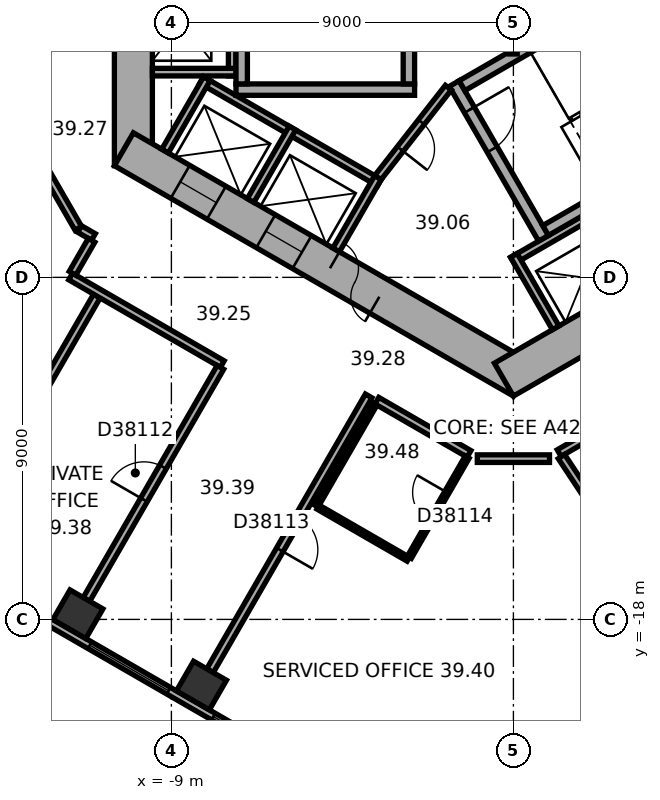
"""IFC4 building model, lengths in metres.
Left out: names, types, materials, properties, quantities, classifications, styles, units other than length and angle.
Written with IfcOpenShell. Run it as: python <this file> out.ifc"""

import sys

from ifc_helpers import new_model, si_unit, direction, frame, frame_2d, origin, origin_2d, place, context, subcontext, project, spatial, rectangle, extrude, element, fill, save


model = new_model("IFC4")
c1 = context("Model", 3, precision=1e-05, world=origin(), true_north=direction((0.0, 1.0)))
c2 = subcontext(c1, "Body", "Model", "MODEL_VIEW")
j1 = project(units=[si_unit("LENGTHUNIT", "METRE"), si_unit("PLANEANGLEUNIT", "RADIAN")], contexts=[c1])
p1 = place(None, origin())
s1 = spatial("IfcSite", under=j1, at=p1, CompositionType="ELEMENT")
p2 = place(p1, origin())
s2 = spatial("IfcBuilding", under=s1, at=p2, CompositionType="ELEMENT")
p3 = place(p2, frame((0.0, 0.0, 161.4)))
s3 = spatial("IfcBuildingStorey", under=s2, at=p3, CompositionType="ELEMENT", Elevation=161.4)
for number, where, z_axis, x_axis in (
    (1, (-11.46, -17.863, 0.0), (0.0, 0.0, 1.0), (0.866, -0.5, 0.0)),
    (2, (-8.208, -19.74, 0.0), (0.0, 0.0, 1.0), (0.866, -0.5, 0.0)),
):
    element("IfcColumn", number, at=place(p3, frame(where, z_axis=z_axis, x_axis=x_axis)), inside=s3, PredefinedType="COLUMN", context=c2, shape_type="SweptSolid", body=[
        extrude(rectangle(XDim=1.0, YDim=0.9, at=origin_2d()), origin(), (0.0, 0.0, 1.0), 3.7),
    ])
p4 = place(p3, frame((-10.0, 6.062, 0.0), z_axis=(0.0, 0.0, 1.0), x_axis=(0.0, -1.0, 0.0)))
e3 = element("IfcWall", 3, at=p4, inside=s3, PredefinedType="SHEAR", context=c2, shape_type="SweptSolid", body=[
    extrude(rectangle(XDim=12.125, YDim=1.0, at=frame_2d((6.062, 0.0))), origin(), (0.0, 0.0, 1.0), 3.7),
])
p5 = place(p4, frame((5.212, 0.0, 0.0)))
e4 = element("IfcOpeningElement", 4, at=p5, cuts=e3, PredefinedType="OPENING", context=c2, shape_type="SweptSolid", body=[
    extrude(rectangle(XDim=1.1, YDim=2.1, at=frame_2d((0.55, 1.05))), frame((0.0, 0.51, 0.0), z_axis=(0.0, -1.0, 0.0), x_axis=(1.0, 0.0, 0.0)), (0.0, 0.0, 1.0), 1.02),
])
p6 = place(p4, frame((7.812, 0.0, 0.0)))
e5 = element("IfcOpeningElement", 5, at=p6, cuts=e3, PredefinedType="OPENING", context=c2, shape_type="SweptSolid", body=[
    extrude(rectangle(XDim=1.1, YDim=2.1, at=frame_2d((0.55, 1.05))), frame((0.0, 0.51, 0.0), z_axis=(0.0, -1.0, 0.0), x_axis=(1.0, 0.0, 0.0)), (0.0, 0.0, 1.0), 1.02),
])
p7 = place(p3, frame((-10.25, -5.629, 0.0), z_axis=(0.0, 0.0, 1.0), x_axis=(0.866022616891, -0.50000482701, 0.0)))
e6 = element("IfcWall", 6, at=p7, inside=s3, PredefinedType="SHEAR", context=c2, shape_type="SweptSolid", body=[
    extrude(rectangle(XDim=12.125, YDim=1.0, at=frame_2d((6.062, 0.0))), origin(), (0.0, 0.0, 1.0), 3.7),
])
p8 = place(p7, frame((6.262, 0.0, 0.0)))
e7 = element("IfcOpeningElement", 7, at=p8, cuts=e6, PredefinedType="OPENING", context=c2, shape_type="SweptSolid", body=[
    extrude(rectangle(XDim=1.5, YDim=2.1, at=frame_2d((0.75, 1.05))), frame((0.0, 0.51, 0.0), z_axis=(0.0, -1.0, 0.0), x_axis=(1.0, 0.0, 0.0)), (0.0, 0.0, 1.0), 1.02),
])
p9 = place(p7, frame((1.712, 0.0, 0.0)))
e8 = element("IfcOpeningElement", 8, at=p9, cuts=e6, PredefinedType="OPENING", context=c2, shape_type="SweptSolid", body=[
    extrude(rectangle(XDim=1.1, YDim=2.1, at=frame_2d((0.55, 1.05))), frame((0.0, 0.51, 0.0), z_axis=(0.0, -1.0, 0.0), x_axis=(1.0, 0.0, 0.0)), (0.0, 0.0, 1.0), 1.02),
])
p10 = place(p7, frame((4.312, 0.0, 0.0)))
e9 = element("IfcOpeningElement", 9, at=p10, cuts=e6, PredefinedType="OPENING", context=c2, shape_type="SweptSolid", body=[
    extrude(rectangle(XDim=1.1, YDim=2.1, at=frame_2d((0.55, 1.05))), frame((0.0, 0.51, 0.0), z_axis=(0.0, -1.0, 0.0), x_axis=(1.0, 0.0, 0.0)), (0.0, 0.0, 1.0), 1.02),
])
p11 = place(p3, frame((-0.25, -11.691, 0.0), z_axis=(0.0, 0.0, 1.0), x_axis=(0.866022616891, 0.50000482701, 0.0)))
e10 = element("IfcWall", 10, at=p11, inside=s3, PredefinedType="SHEAR", context=c2, shape_type="SweptSolid", body=[
    extrude(rectangle(XDim=12.125, YDim=1.0, at=frame_2d((6.062, 0.0))), origin(), (0.0, 0.0, 1.0), 3.7),
])
p12 = place(p11, frame((2.612, 0.0, 0.0)))
e11 = element("IfcOpeningElement", 11, at=p12, cuts=e10, PredefinedType="OPENING", context=c2, shape_type="SweptSolid", body=[
    extrude(rectangle(XDim=1.1, YDim=2.1, at=frame_2d((0.55, 1.05))), frame((0.0, 0.51, 0.0), z_axis=(0.0, -1.0, 0.0), x_axis=(1.0, 0.0, 0.0)), (0.0, 0.0, 1.0), 1.02),
])
p13 = place(p11, frame((5.212, 0.0, 0.0)))
e12 = element("IfcOpeningElement", 12, at=p13, cuts=e10, PredefinedType="OPENING", context=c2, shape_type="SweptSolid", body=[
    extrude(rectangle(XDim=1.1, YDim=2.1, at=frame_2d((0.55, 1.05))), frame((0.0, 0.51, 0.0), z_axis=(0.0, -1.0, 0.0), x_axis=(1.0, 0.0, 0.0)), (0.0, 0.0, 1.0), 1.02),
])
p14 = place(p11, frame((7.812, 0.0, 0.0)))
e13 = element("IfcOpeningElement", 13, at=p14, cuts=e10, PredefinedType="OPENING", context=c2, shape_type="SweptSolid", body=[
    extrude(rectangle(XDim=1.1, YDim=2.1, at=frame_2d((0.55, 1.05))), frame((0.0, 0.51, 0.0), z_axis=(0.0, -1.0, 0.0), x_axis=(1.0, 0.0, 0.0)), (0.0, 0.0, 1.0), 1.02),
])
p15 = place(p3, frame((-18.789, -14.267, 0.0), z_axis=(0.0, 0.0, 1.0), x_axis=(0.866023315909, -0.500003616288, 0.0)))
e14 = element("IfcWall", 14, at=p15, inside=s3, PredefinedType="STANDARD", context=c2, shape_type="SweptSolid", body=[
    extrude(rectangle(XDim=20.044, YDim=0.2, at=frame_2d((10.022, 0.0))), origin(), (0.0, 0.0, 1.0), 3.7),
])
p16 = place(p15, frame((1.314, 0.0, 0.9)))
e15 = element("IfcOpeningElement", 15, at=p16, cuts=e14, PredefinedType="OPENING", context=c2, shape_type="SweptSolid", body=[
    extrude(rectangle(XDim=2.4, YDim=2.0, at=frame_2d((1.2, 1.0))), frame((0.0, 0.11, 0.0), z_axis=(0.0, -1.0, 0.0), x_axis=(1.0, 0.0, 0.0)), (0.0, 0.0, 1.0), 0.22),
])
p17 = place(p15, frame((5.069, 0.0, 0.9)))
e16 = element("IfcOpeningElement", 16, at=p17, cuts=e14, PredefinedType="OPENING", context=c2, shape_type="SweptSolid", body=[
    extrude(rectangle(XDim=2.4, YDim=2.0, at=frame_2d((1.2, 1.0))), frame((0.0, 0.11, 0.0), z_axis=(0.0, -1.0, 0.0), x_axis=(1.0, 0.0, 0.0)), (0.0, 0.0, 1.0), 0.22),
])
p18 = place(p15, frame((8.823, 0.0, 0.9)))
e17 = element("IfcOpeningElement", 17, at=p18, cuts=e14, PredefinedType="OPENING", context=c2, shape_type="SweptSolid", body=[
    extrude(rectangle(XDim=2.4, YDim=2.0, at=frame_2d((1.2, 1.0))), frame((0.0, 0.11, 0.0), z_axis=(0.0, -1.0, 0.0), x_axis=(1.0, 0.0, 0.0)), (0.0, 0.0, 1.0), 0.22),
])
p19 = place(p15, frame((12.577, 0.0, 0.9)))
e18 = element("IfcOpeningElement", 18, at=p19, cuts=e14, PredefinedType="OPENING", context=c2, shape_type="SweptSolid", body=[
    extrude(rectangle(XDim=2.4, YDim=2.0, at=frame_2d((1.2, 1.0))), frame((0.0, 0.11, 0.0), z_axis=(0.0, -1.0, 0.0), x_axis=(1.0, 0.0, 0.0)), (0.0, 0.0, 1.0), 0.22),
])
p20 = place(p15, frame((16.331, 0.0, 0.9)))
e19 = element("IfcOpeningElement", 19, at=p20, cuts=e14, PredefinedType="OPENING", context=c2, shape_type="SweptSolid", body=[
    extrude(rectangle(XDim=2.4, YDim=2.0, at=frame_2d((1.2, 1.0))), frame((0.0, 0.11, 0.0), z_axis=(0.0, -1.0, 0.0), x_axis=(1.0, 0.0, 0.0)), (0.0, 0.0, 1.0), 0.22),
])
p21 = place(p3, frame((-7.4, 4.3, 0.0), z_axis=(0.0, 0.0, 1.0), x_axis=(0.0, -1.0, 0.0)))
e20 = element("IfcWall", 20, at=p21, inside=s3, PredefinedType="PARTITIONING", context=c2, shape_type="SweptSolid", body=[
    extrude(rectangle(XDim=8.0, YDim=0.2, at=frame_2d((4.0, 0.0))), origin(), (0.0, 0.0, 1.0), 3.42),
])
p22 = place(p3, frame((-7.3, -3.6, 0.0), z_axis=(0.0, 0.0, 1.0), x_axis=(-1.0, 0.0, 0.0)))
e21 = element("IfcWall", 21, at=p22, inside=s3, PredefinedType="PARTITIONING", context=c2, shape_type="SweptSolid", body=[
    extrude(rectangle(XDim=2.2, YDim=0.2, at=frame_2d((1.1, 0.0))), origin(), (0.0, 0.0, 1.0), 3.42),
])
p23 = place(p3, frame((-8.203, -3.809, 0.0), z_axis=(0.0, 0.0, 1.0), x_axis=(0.866028230842, -0.499995103361, 0.0)))
e22 = element("IfcWall", 22, at=p23, inside=s3, PredefinedType="PARTITIONING", context=c2, shape_type="SweptSolid", body=[
    extrude(rectangle(XDim=5.4, YDim=0.2, at=frame_2d((2.7, 0.0))), origin(), (0.0, 0.0, 1.0), 3.42),
])
for number, where, z_axis, x_axis in (
    (23, (-8.067, -3.772, 0.0), (0.0, 0.0, 1.0), (-0.5, -0.866, 0.0)),
    (24, (-5.815, -5.072, 0.0), (0.0, 0.0, 1.0), (-0.5, -0.866, 0.0)),
):
    element("IfcWall", number, at=place(p3, frame(where, z_axis=z_axis, x_axis=x_axis)), inside=s3, PredefinedType="PARTITIONING", context=c2, shape_type="SweptSolid", body=[
        extrude(rectangle(XDim=2.2, YDim=0.2, at=frame_2d((1.1, 0.0))), origin(), (0.0, 0.0, 1.0), 3.42),
    ])
p24 = place(p3, frame((-3.563, -6.372, 0.0), z_axis=(0.0, 0.0, 1.0), x_axis=(-0.499994660107, -0.866028486751, 0.0)))
e25 = element("IfcWall", 25, at=p24, inside=s3, PredefinedType="PARTITIONING", context=c2, shape_type="SweptSolid", body=[
    extrude(rectangle(XDim=2.2, YDim=0.2, at=frame_2d((1.1, 0.0))), origin(), (0.0, 0.0, 1.0), 3.42),
])
p25 = place(p3, frame((-0.024, -8.559, 0.0), z_axis=(0.0, 0.0, 1.0), x_axis=(0.866026010844, 0.49999894854, 0.0)))
e26 = element("IfcWall", 26, at=p25, inside=s3, PredefinedType="PARTITIONING", context=c2, shape_type="SweptSolid", body=[
    extrude(rectangle(XDim=8.0, YDim=0.2, at=frame_2d((4.0, 0.0))), origin(), (0.0, 0.0, 1.0), 3.42),
])
p26 = place(p3, frame((0.013, -8.422, 0.0), z_axis=(0.0, 0.0, 1.0), x_axis=(0.500077893725, -0.86598042715, 0.0)))
e27 = element("IfcWall", 27, at=p26, inside=s3, PredefinedType="PARTITIONING", context=c2, shape_type="SweptSolid", body=[
    extrude(rectangle(XDim=2.2, YDim=0.2, at=frame_2d((1.1, 0.0))), origin(), (0.0, 0.0, 1.0), 3.42),
])
p27 = place(p3, frame((-2.6, -4.06, 0.0), z_axis=(0.0, 0.0, 1.0), x_axis=(-1.0, 0.0, 0.0)))
e28 = element("IfcWall", 28, at=p27, inside=s3, PredefinedType="SHEAR", context=c2, shape_type="SweptSolid", body=[
    extrude(rectangle(XDim=4.7, YDim=0.3, at=frame_2d((2.35, 0.0))), origin(), (0.0, 0.0, 1.0), 3.42),
])
for number, where, z_axis, x_axis in (
    (29, (-2.75, 3.15, 0.0), (0.0, 0.0, 1.0), (0.0, -1.0, 0.0)),
    (30, (-7.15, 3.15, 0.0), (0.0, 0.0, 1.0), (0.0, -1.0, 0.0)),
):
    element("IfcWall", number, at=place(p3, frame(where, z_axis=z_axis, x_axis=x_axis)), inside=s3, PredefinedType="SHEAR", context=c2, shape_type="SweptSolid", body=[
        extrude(rectangle(XDim=7.06, YDim=0.3, at=frame_2d((3.53, 0.0))), origin(), (0.0, 0.0, 1.0), 3.42),
    ])
p28 = place(p3, frame((-1.558, -3.902, 0.0), z_axis=(0.0, 0.0, 1.0), x_axis=(0.499977259774, -0.866038532462, 0.0)))
e31 = element("IfcWall", 31, at=p28, inside=s3, PredefinedType="SHEAR", context=c2, shape_type="SweptSolid", body=[
    extrude(rectangle(XDim=4.7, YDim=0.3, at=frame_2d((2.35, 0.0))), origin(), (0.0, 0.0, 1.0), 3.42),
])
p29 = place(p28, frame((0.8, 0.0, 0.0)))
e32 = element("IfcOpeningElement", 32, at=p29, cuts=e31, PredefinedType="OPENING", context=c2, shape_type="SweptSolid", body=[
    extrude(rectangle(XDim=1.2, YDim=2.1, at=frame_2d((0.6, 1.05))), frame((0.0, 0.16, 0.0), z_axis=(0.0, -1.0, 0.0), x_axis=(1.0, 0.0, 0.0)), (0.0, 0.0, 1.0), 0.32),
])
for number, where, z_axis, x_axis in (
    (33, (-1.353, -3.957, 0.0), (0.0, 0.0, 1.0), (0.866, 0.5, 0.0)),
    (34, (0.847, -7.767, 0.0), (0.0, 0.0, 1.0), (0.866, 0.5, 0.0)),
):
    element("IfcWall", number, at=place(p3, frame(where, z_axis=z_axis, x_axis=x_axis)), inside=s3, PredefinedType="SHEAR", context=c2, shape_type="SweptSolid", body=[
        extrude(rectangle(XDim=7.06, YDim=0.3, at=frame_2d((3.53, 0.0))), origin(), (0.0, 0.0, 1.0), 3.42),
    ])
p30 = place(p3, frame((-1.712, -4.008, 0.0), z_axis=(0.0, 0.0, 1.0), x_axis=(-0.616549420702, -0.787316208287, 0.0)))
e35 = element("IfcWall", 35, at=p30, inside=s3, PredefinedType="PARTITIONING", context=c2, shape_type="SweptSolid", body=[
    extrude(rectangle(XDim=3.002, YDim=0.2, at=frame_2d((1.501, 0.0))), origin(), (0.0, 0.0, 1.0), 3.42),
])
p31 = place(p30, frame((1.15, 0.0, 0.0)))
e36 = element("IfcOpeningElement", 36, at=p31, cuts=e35, PredefinedType="OPENING", context=c2, shape_type="SweptSolid", body=[
    extrude(rectangle(XDim=0.9, YDim=2.1, at=frame_2d((0.45, 1.05))), frame((0.0, 0.11, 0.0), z_axis=(0.0, -1.0, 0.0), x_axis=(1.0, 0.0, 0.0)), (0.0, 0.0, 1.0), 0.22),
])
p32 = place(p3, frame((0.0, -3.122, 0.0), z_axis=(0.0, 0.0, 1.0), x_axis=(0.0, 1.0, 0.0)))
e37 = element("IfcWall", 37, at=p32, inside=s3, PredefinedType="PARTITIONING", context=c2, shape_type="SweptSolid", body=[
    extrude(rectangle(XDim=6.245, YDim=0.2, at=frame_2d((3.122, 0.0))), origin(), (0.0, 0.0, 1.0), 3.42),
])
p33 = place(p3, frame((-14.486, -15.597, 0.0), z_axis=(0.0, 0.0, 1.0), x_axis=(0.499983284935, 0.866035054017, 0.0)))
e38 = element("IfcWall", 38, at=p33, inside=s3, PredefinedType="PARTITIONING", context=c2, shape_type="SweptSolid", body=[
    extrude(rectangle(XDim=7.049, YDim=0.2, at=frame_2d((3.524, 0.0))), origin(), (0.0, 0.0, 1.0), 3.42),
])
p34 = place(p3, frame((-12.4, -6.062, 0.0), z_axis=(0.0, 0.0, 1.0), x_axis=(0.500022797313, -0.86601224135, 0.0)))
e39 = element("IfcWall", 39, at=p34, inside=s3, PredefinedType="PARTITIONING", context=c2, shape_type="SweptSolid", body=[
    extrude(rectangle(XDim=1.9, YDim=0.2, at=frame_2d((0.95, 0.0))), origin(), (0.0, 0.0, 1.0), 3.42),
])
p35 = place(p3, frame((-11.651, -8.978, 0.0), z_axis=(0.0, 0.0, 1.0), x_axis=(0.866010893236, -0.500025132165, 0.0)))
e40 = element("IfcWall", 40, at=p35, inside=s3, PredefinedType="PARTITIONING", context=c2, shape_type="SweptSolid", body=[
    extrude(rectangle(XDim=4.608, YDim=0.2, at=frame_2d((2.304, 0.0))), origin(), (0.0, 0.0, 1.0), 3.42),
])
p36 = place(p3, frame((-11.415, -7.728, 0.0), z_axis=(0.0, 0.0, 1.0), x_axis=(0.865915281873, -0.500190688257, 0.0)))
e41 = element("IfcWall", 41, at=p36, inside=s3, PredefinedType="PARTITIONING", context=c2, shape_type="SweptSolid", body=[
    extrude(rectangle(XDim=0.421, YDim=0.2, at=frame_2d((0.21, 0.0))), origin(), (0.0, 0.0, 1.0), 3.42),
])
p37 = place(p3, frame((-11.235, -17.474, 0.0), z_axis=(0.0, 0.0, 1.0), x_axis=(0.500009260695, 0.866020057054, 0.0)))
e42 = element("IfcWall", 42, at=p37, inside=s3, PredefinedType="PARTITIONING", context=c2, shape_type="SweptSolid", body=[
    extrude(rectangle(XDim=7.049, YDim=0.2, at=frame_2d((3.524, 0.0))), origin(), (0.0, 0.0, 1.0), 2.87),
])
p38 = place(p37, frame((3.024, 0.0, 0.0)))
e43 = element("IfcOpeningElement", 43, at=p38, cuts=e42, PredefinedType="OPENING", context=c2, shape_type="SweptSolid", body=[
    extrude(rectangle(XDim=1.0, YDim=2.1, at=frame_2d((0.5, 1.05))), frame((0.0, 0.11, 0.0), z_axis=(0.0, -1.0, 0.0), x_axis=(1.0, 0.0, 0.0)), (0.0, 0.0, 1.0), 0.22),
])
p39 = place(p3, frame((-11.101, -8.025, 0.0), z_axis=(0.0, 0.0, 1.0), x_axis=(-0.500074377092, -0.865982457891, 0.0)))
e44 = element("IfcWall", 44, at=p39, inside=s3, PredefinedType="PARTITIONING", context=c2, shape_type="SweptSolid", body=[
    extrude(rectangle(XDim=1.001, YDim=0.2, at=frame_2d((0.5, 0.0))), origin(), (0.0, 0.0, 1.0), 3.42),
])
p40 = place(p3, frame((-7.984, -19.351, 0.0), z_axis=(0.0, 0.0, 1.0), x_axis=(0.500010139422, 0.866019549707, 0.0)))
e45 = element("IfcWall", 45, at=p40, inside=s3, PredefinedType="PARTITIONING", context=c2, shape_type="SweptSolid", body=[
    extrude(rectangle(XDim=8.35, YDim=0.2, at=frame_2d((4.175, 0.0))), origin(), (0.0, 0.0, 1.0), 3.42),
])
p41 = place(p40, frame((3.675, 0.0, 0.0)))
e46 = element("IfcOpeningElement", 46, at=p41, cuts=e45, PredefinedType="OPENING", context=c2, shape_type="SweptSolid", body=[
    extrude(rectangle(XDim=1.0, YDim=2.1, at=frame_2d((0.5, 1.05))), frame((0.0, 0.11, 0.0), z_axis=(0.0, -1.0, 0.0), x_axis=(1.0, 0.0, 0.0)), (0.0, 0.0, 1.0), 0.22),
])
p42 = place(p3, frame((-5.192, -15.016, 0.0), z_axis=(0.0, 0.0, 1.0), x_axis=(0.500026960575, 0.86600983753, 0.0)))
e47 = element("IfcWall", 47, at=p42, inside=s3, PredefinedType="PARTITIONING", context=c2, shape_type="SweptSolid", body=[
    extrude(rectangle(XDim=3.1, YDim=0.12, at=frame_2d((1.55, 0.0))), origin(), (0.0, 0.0, 1.0), 3.42),
])
p43 = place(p3, frame((-3.592, -12.244, 0.0), z_axis=(0.0, 0.0, 1.0), x_axis=(0.866034573852, -0.49998411664, 0.0)))
e48 = element("IfcWall", 48, at=p43, inside=s3, PredefinedType="PARTITIONING", context=c2, shape_type="SweptSolid", body=[
    extrude(rectangle(XDim=2.8, YDim=0.2, at=frame_2d((1.4, 0.0))), origin(), (0.0, 0.0, 1.0), 3.42),
])
p44 = place(p3, frame((-2.767, -16.416, 0.0), z_axis=(0.0, 0.0, 1.0), x_axis=(-0.865997131366, 0.500048966069, 0.0)))
e49 = element("IfcWall", 49, at=p44, inside=s3, PredefinedType="PARTITIONING", context=c2, shape_type="SweptSolid", body=[
    extrude(rectangle(XDim=2.74, YDim=0.12, at=frame_2d((1.37, 0.0))), origin(), (0.0, 0.0, 1.0), 3.42),
])
p45 = place(p3, frame((-1.217, -13.731, 0.0), z_axis=(0.0, 0.0, 1.0), x_axis=(-0.499991248344, -0.866030456496, 0.0)))
e50 = element("IfcWall", 50, at=p45, inside=s3, PredefinedType="PARTITIONING", context=c2, shape_type="SweptSolid", body=[
    extrude(rectangle(XDim=3.04, YDim=0.12, at=frame_2d((1.52, 0.0))), origin(), (0.0, 0.0, 1.0), 3.42),
])
p46 = place(p45, frame((1.07, 0.0, 0.0)))
e51 = element("IfcOpeningElement", 51, at=p46, cuts=e50, PredefinedType="OPENING", context=c2, shape_type="SweptSolid", body=[
    extrude(rectangle(XDim=0.9, YDim=2.1, at=frame_2d((0.45, 1.05))), frame((0.0, 0.07, 0.0), z_axis=(0.0, -1.0, 0.0), x_axis=(1.0, 0.0, 0.0)), (0.0, 0.0, 1.0), 0.14),
])
p47 = place(p3, frame((-0.95, -13.77, 0.0), z_axis=(0.0, 0.0, 1.0), x_axis=(1.0, 0.0, 0.0)))
e52 = element("IfcWall", 52, at=p47, inside=s3, PredefinedType="PARTITIONING", context=c2, shape_type="SweptSolid", body=[
    extrude(rectangle(XDim=1.9, YDim=0.2, at=frame_2d((0.95, 0.0))), origin(), (0.0, 0.0, 1.0), 3.42),
])
p48 = place(p3, frame((1.204, -13.623, 0.0), z_axis=(0.0, 0.0, 1.0), x_axis=(0.866040989419, 0.499973003918, 0.0)))
e53 = element("IfcWall", 53, at=p48, inside=s3, PredefinedType="PARTITIONING", context=c2, shape_type="SweptSolid", body=[
    extrude(rectangle(XDim=1.068, YDim=0.2, at=frame_2d((0.534, 0.0))), origin(), (0.0, 0.0, 1.0), 3.42),
])
p49 = place(p3, frame((6.02, -20.899, 0.0), z_axis=(0.0, 0.0, 1.0), x_axis=(-0.551943990108, 0.833881185651, 0.0)))
e54 = element("IfcWall", 54, at=p49, inside=s3, PredefinedType="PARTITIONING", context=c2, shape_type="SweptSolid", body=[
    extrude(rectangle(XDim=8.615, YDim=0.2, at=frame_2d((4.308, 0.0))), origin(), (0.0, 0.0, 1.0), 3.42),
])
p50 = place(p18, origin())
e55 = element("IfcWindow", 55, at=p50, inside=s3, PartitioningType="SINGLE_PANEL", PredefinedType="WINDOW", context=c2, shape_type="SweptSolid", body=[
    extrude(rectangle(XDim=2.4, YDim=2.0, at=frame_2d((1.2, 1.0))), frame((0.0, 0.03, 0.0), z_axis=(0.0, -1.0, 0.0), x_axis=(1.0, 0.0, 0.0)), (0.0, 0.0, 1.0), 0.06),
])
fill(e17, e55)
p51 = place(p19, origin())
e56 = element("IfcWindow", 56, at=p51, inside=s3, PartitioningType="SINGLE_PANEL", PredefinedType="WINDOW", context=c2, shape_type="SweptSolid", body=[
    extrude(rectangle(XDim=2.4, YDim=2.0, at=frame_2d((1.2, 1.0))), frame((0.0, 0.03, 0.0), z_axis=(0.0, -1.0, 0.0), x_axis=(1.0, 0.0, 0.0)), (0.0, 0.0, 1.0), 0.06),
])
fill(e18, e56)
p52 = place(p8, origin())
e57 = element("IfcDoor", 57, at=p52, inside=s3, OperationType="DOUBLE_DOOR_SINGLE_SWING", PredefinedType="DOOR", context=c2, shape_type="SweptSolid", body=[
    extrude(rectangle(XDim=1.5, YDim=2.1, at=frame_2d((0.75, 1.05))), frame((0.0, 0.025, 0.0), z_axis=(0.0, -1.0, 0.0), x_axis=(1.0, 0.0, 0.0)), (0.0, 0.0, 1.0), 0.05),
])
fill(e7, e57)
p53 = place(p29, origin())
e58 = element("IfcDoor", 58, at=p53, inside=s3, OperationType="SINGLE_SWING_RIGHT", PredefinedType="DOOR", context=c2, shape_type="SweptSolid", body=[
    extrude(rectangle(XDim=1.2, YDim=2.1, at=frame_2d((0.6, 1.05))), frame((0.0, 0.025, 0.0), z_axis=(0.0, -1.0, 0.0), x_axis=(1.0, 0.0, 0.0)), (0.0, 0.0, 1.0), 0.05),
])
fill(e32, e58)
p54 = place(p31, origin())
e59 = element("IfcDoor", 59, at=p54, inside=s3, OperationType="SINGLE_SWING_LEFT", PredefinedType="DOOR", context=c2, shape_type="SweptSolid", body=[
    extrude(rectangle(XDim=0.9, YDim=2.1, at=frame_2d((0.45, 1.05))), frame((0.0, 0.025, 0.0), z_axis=(0.0, -1.0, 0.0), x_axis=(1.0, 0.0, 0.0)), (0.0, 0.0, 1.0), 0.05),
])
fill(e36, e59)
p55 = place(p9, origin())
e60 = element("IfcDoor", 60, at=p55, inside=s3, OperationType="DOUBLE_DOOR_SLIDING", PredefinedType="DOOR", context=c2, shape_type="SweptSolid", body=[
    extrude(rectangle(XDim=1.1, YDim=2.1, at=frame_2d((0.55, 1.05))), frame((0.0, 0.025, 0.0), z_axis=(0.0, -1.0, 0.0), x_axis=(1.0, 0.0, 0.0)), (0.0, 0.0, 1.0), 0.05),
])
fill(e8, e60)
p56 = place(p10, origin())
e61 = element("IfcDoor", 61, at=p56, inside=s3, OperationType="DOUBLE_DOOR_SLIDING", PredefinedType="DOOR", context=c2, shape_type="SweptSolid", body=[
    extrude(rectangle(XDim=1.1, YDim=2.1, at=frame_2d((0.55, 1.05))), frame((0.0, 0.025, 0.0), z_axis=(0.0, -1.0, 0.0), x_axis=(1.0, 0.0, 0.0)), (0.0, 0.0, 1.0), 0.05),
])
fill(e9, e61)
p57 = place(p38, origin())
e62 = element("IfcDoor", 62, at=p57, inside=s3, OperationType="SINGLE_SWING_LEFT", PredefinedType="DOOR", context=c2, shape_type="SweptSolid", body=[
    extrude(rectangle(XDim=1.0, YDim=2.1, at=frame_2d((0.5, 1.05))), frame((0.0, 0.025, 0.0), z_axis=(0.0, -1.0, 0.0), x_axis=(1.0, 0.0, 0.0)), (0.0, 0.0, 1.0), 0.05),
])
fill(e43, e62)
p58 = place(p41, origin())
e63 = element("IfcDoor", 63, at=p58, inside=s3, OperationType="SINGLE_SWING_LEFT", PredefinedType="DOOR", context=c2, shape_type="SweptSolid", body=[
    extrude(rectangle(XDim=1.0, YDim=2.1, at=frame_2d((0.5, 1.05))), frame((0.0, 0.025, 0.0), z_axis=(0.0, -1.0, 0.0), x_axis=(1.0, 0.0, 0.0)), (0.0, 0.0, 1.0), 0.05),
])
fill(e46, e63)
p59 = place(p46, origin())
e64 = element("IfcDoor", 64, at=p59, inside=s3, OperationType="SINGLE_SWING_LEFT", PredefinedType="DOOR", context=c2, shape_type="SweptSolid", body=[
    extrude(rectangle(XDim=0.9, YDim=2.1, at=frame_2d((0.45, 1.05))), frame((0.0, 0.025, 0.0), z_axis=(0.0, -1.0, 0.0), x_axis=(1.0, 0.0, 0.0)), (0.0, 0.0, 1.0), 0.05),
])
fill(e51, e64)
save(model, sys.argv[1])
